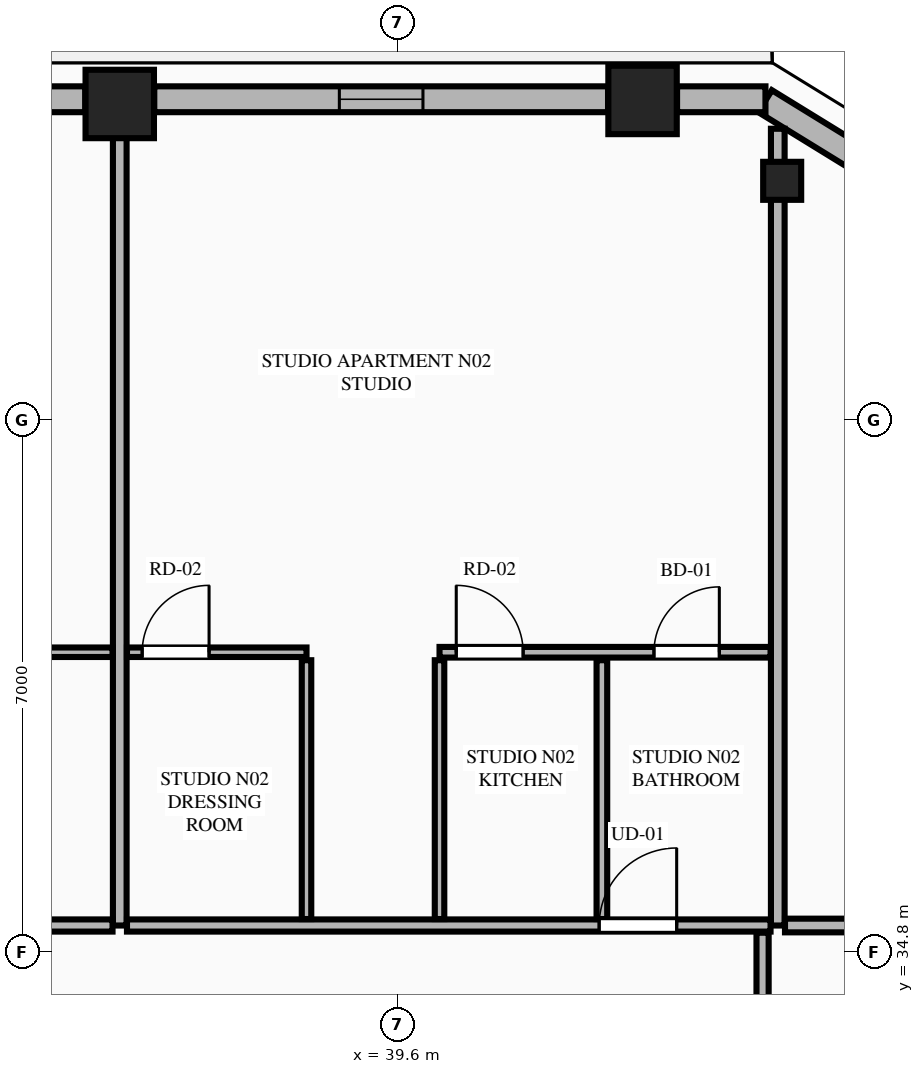
"""IFC4 building model, lengths in metres.
Left out: names, types, materials, properties, quantities, classifications, styles, units other than length and angle.
Written with IfcOpenShell. Run it as: python <this file> out.ifc"""

import sys

from ifc_helpers import new_model, si_unit, direction, frame, frame_2d, origin, origin_2d, place, context, subcontext, project, spatial, rectangle, extrude, element, fill, save


model = new_model("IFC4")
c1 = context("Model", 3, precision=1e-05, world=origin(), true_north=direction((0.0, 1.0)))
c2 = subcontext(c1, "Body", "Model", "MODEL_VIEW")
j1 = project(units=[si_unit("LENGTHUNIT", "METRE"), si_unit("PLANEANGLEUNIT", "RADIAN")], contexts=[c1])
p1 = place(None, origin())
s1 = spatial("IfcSite", under=j1, at=p1, CompositionType="ELEMENT")
p2 = place(p1, origin())
s2 = spatial("IfcBuilding", under=s1, at=p2, CompositionType="ELEMENT")
p3 = place(p2, frame((0.0, 0.0, 179.0)))
s3 = spatial("IfcBuildingStorey", under=s2, at=p3, CompositionType="ELEMENT", Elevation=179.0)
for number, where, z_axis, x_axis in (
    (1, (42.821, 46.011, 0.0), (0.0, 0.0, 1.0), (1.0, 0.0, 0.0)),
    (2, (35.943, 45.958, 0.0), (0.0, 0.0, 1.0), (1.0, 0.0, 0.0)),
):
    element("IfcColumn", number, at=place(p3, frame(where, z_axis=z_axis, x_axis=x_axis)), inside=s3, PredefinedType="COLUMN", context=c2, shape_type="SweptSolid", body=[
        extrude(rectangle(XDim=0.9, YDim=0.9, at=origin_2d()), origin(), (0.0, 0.0, 1.0), 3.55),
    ])
p4 = place(p3, frame((44.658, 44.947, 0.0), z_axis=(0.0, 0.0, 1.0), x_axis=(-0.865230187018, 0.501374833306, 0.0)))
e3 = element("IfcColumn", 3, at=p4, inside=s3, PredefinedType="PILASTER", context=c2, shape_type="SweptSolid", body=[
    extrude(rectangle(XDim=0.5, YDim=0.35, at=origin_2d()), origin(), (0.0, 0.0, 1.0), 3.55),
])
p5 = place(p3, frame((45.862, 45.116, 0.0), z_axis=(0.0, 0.0, 1.0), x_axis=(-0.851713271379, 0.524008113828, 0.0)))
e4 = element("IfcWall", 4, at=p5, inside=s3, PredefinedType="STANDARD", context=c2, shape_type="SweptSolid", body=[
    extrude(rectangle(XDim=1.678, YDim=0.34, at=frame_2d((0.839, 0.0))), origin(), (0.0, 0.0, 1.0), 3.35),
])
p6 = place(p3, frame((44.438, 46.02, 0.0), z_axis=(0.0, 0.0, 1.0), x_axis=(-1.0, 0.0, 0.0)))
e5 = element("IfcWall", 5, at=p6, inside=s3, PredefinedType="STANDARD", context=c2, shape_type="SweptSolid", body=[
    extrude(rectangle(XDim=1.163, YDim=0.34, at=frame_2d((0.582, 0.0))), origin(), (0.0, 0.0, 1.0), 3.35),
])
p7 = place(p3, frame((42.367, 46.02, 0.0), z_axis=(0.0, 0.0, 1.0), x_axis=(-1.0, 0.0, 0.0)))
e6 = element("IfcWall", 6, at=p7, inside=s3, PredefinedType="STANDARD", context=c2, shape_type="SweptSolid", body=[
    extrude(rectangle(XDim=5.97, YDim=0.34, at=frame_2d((2.985, 0.0))), origin(), (0.0, 0.0, 1.0), 2.883),
])
p8 = place(p7, frame((2.435, 0.0, 0.75)))
e7 = element("IfcOpeningElement", 7, at=p8, cuts=e6, PredefinedType="OPENING", context=c2, shape_type="SweptSolid", body=[
    extrude(rectangle(XDim=1.1, YDim=1.983, at=frame_2d((0.55, 0.991))), frame((0.0, 0.18, 0.0), z_axis=(0.0, -1.0, 0.0), x_axis=(1.0, 0.0, 0.0)), (0.0, 0.0, 1.0), 0.36),
])
p9 = place(p3, frame((35.489, 46.02, 0.0), z_axis=(0.0, 0.0, 1.0), x_axis=(-1.0, 0.0, 0.0)))
e8 = element("IfcWall", 8, at=p9, inside=s3, PredefinedType="STANDARD", context=c2, shape_type="SweptSolid", body=[
    extrude(rectangle(XDim=6.178, YDim=0.34, at=frame_2d((3.089, 0.0))), origin(), (0.0, 0.0, 1.0), 2.883),
])
p10 = place(p9, frame((1.668, 0.0, 0.0)))
e9 = element("IfcOpeningElement", 9, at=p10, cuts=e8, PredefinedType="OPENING", context=c2, shape_type="SweptSolid", body=[
    extrude(rectangle(XDim=1.1, YDim=2.25, at=frame_2d((0.55, 1.125))), frame((0.0, 0.18, 0.0), z_axis=(0.0, -1.0, 0.0), x_axis=(1.0, 0.0, 0.0)), (0.0, 0.0, 1.0), 0.36),
])
p11 = place(p9, frame((4.872, 0.0, 0.75)))
e10 = element("IfcOpeningElement", 10, at=p11, cuts=e8, PredefinedType="OPENING", context=c2, shape_type="SweptSolid", body=[
    extrude(rectangle(XDim=1.086, YDim=1.983, at=frame_2d((0.543, 0.991))), frame((0.0, 0.18, 0.0), z_axis=(0.0, -1.0, 0.0), x_axis=(1.0, 0.0, 0.0)), (0.0, 0.0, 1.0), 0.36),
])
p12 = place(p3, frame((35.943, 35.15, 0.0), z_axis=(0.0, 0.0, 1.0), x_axis=(0.0, 1.0, 0.0)))
e11 = element("IfcWall", 11, at=p12, inside=s3, PredefinedType="PARTITIONING", context=c2, shape_type="SweptSolid", body=[
    extrude(rectangle(XDim=10.695, YDim=0.18, at=frame_2d((5.348, 0.0))), origin(), (0.0, 0.0, 1.0), 2.807),
])
p13 = place(p3, frame((44.6, 35.15, 0.0), z_axis=(0.0, 0.0, 1.0), x_axis=(0.0, 1.0, 0.0)))
e12 = element("IfcWall", 12, at=p13, inside=s3, PredefinedType="PARTITIONING", context=c2, shape_type="SweptSolid", body=[
    extrude(rectangle(XDim=10.482, YDim=0.18, at=frame_2d((5.241, 0.0))), origin(), (0.0, 0.0, 1.0), 3.35),
])
p14 = place(p3, frame((20.295, 35.15, 0.0), z_axis=(0.0, 0.0, 1.0), x_axis=(1.0, 0.0, 0.0)))
e13 = element("IfcWall", 13, at=p14, inside=s3, PredefinedType="PARTITIONING", context=c2, shape_type="SweptSolid", body=[
    extrude(rectangle(XDim=15.553, YDim=0.16, at=frame_2d((7.776, 0.0))), origin(), (0.0, 0.0, 1.0), 3.35),
])
p15 = place(p14, frame((0.405, 0.0, 0.0)))
e14 = element("IfcOpeningElement", 14, at=p15, cuts=e13, PredefinedType="OPENING", context=c2, shape_type="SweptSolid", body=[
    extrude(rectangle(XDim=1.02, YDim=2.25, at=frame_2d((0.51, 1.125))), frame((0.0, 0.09, 0.0), z_axis=(0.0, -1.0, 0.0), x_axis=(1.0, 0.0, 0.0)), (0.0, 0.0, 1.0), 0.18),
])
p16 = place(p3, frame((30.95, 38.745, 0.0), z_axis=(0.0, 0.0, 1.0), x_axis=(1.0, 0.0, 0.0)))
e15 = element("IfcWall", 15, at=p16, inside=s3, PredefinedType="PARTITIONING", context=c2, shape_type="SweptSolid", body=[
    extrude(rectangle(XDim=4.898, YDim=0.125, at=frame_2d((2.449, 0.0))), origin(), (0.0, 0.0, 1.0), 3.35),
])
p17 = place(p16, frame((2.024, 0.0, 0.0)))
e16 = element("IfcOpeningElement", 16, at=p17, cuts=e15, PredefinedType="OPENING", context=c2, shape_type="SweptSolid", body=[
    extrude(rectangle(XDim=0.86, YDim=2.1, at=frame_2d((0.43, 1.05))), frame((0.0, 0.073, 0.0), z_axis=(0.0, -1.0, 0.0), x_axis=(1.0, 0.0, 0.0)), (0.0, 0.0, 1.0), 0.145),
])
p18 = place(p3, frame((36.038, 35.15, 0.0), z_axis=(0.0, 0.0, 1.0), x_axis=(1.0, 0.0, 0.0)))
e17 = element("IfcWall", 17, at=p18, inside=s3, PredefinedType="PARTITIONING", context=c2, shape_type="SweptSolid", body=[
    extrude(rectangle(XDim=8.467, YDim=0.16, at=frame_2d((4.233, 0.0))), origin(), (0.0, 0.0, 1.0), 3.35),
])
p19 = place(p18, frame((6.212, 0.0, 0.0)))
e18 = element("IfcOpeningElement", 18, at=p19, cuts=e17, PredefinedType="OPENING", context=c2, shape_type="SweptSolid", body=[
    extrude(rectangle(XDim=1.02, YDim=2.25, at=frame_2d((0.51, 1.125))), frame((0.0, 0.09, 0.0), z_axis=(0.0, -1.0, 0.0), x_axis=(1.0, 0.0, 0.0)), (0.0, 0.0, 1.0), 0.18),
])
p20 = place(p3, frame((40.15, 35.235, 0.0), z_axis=(0.0, 0.0, 1.0), x_axis=(0.0, 1.0, 0.0)))
e19 = element("IfcWall", 19, at=p20, inside=s3, PredefinedType="PARTITIONING", context=c2, shape_type="SweptSolid", body=[
    extrude(rectangle(XDim=3.405, YDim=0.125, at=frame_2d((1.702, 0.0))), origin(), (0.0, 0.0, 1.0), 3.35),
])
p21 = place(p3, frame((40.15, 38.745, 0.0), z_axis=(0.0, 0.0, 1.0), x_axis=(1.0, 0.0, 0.0)))
e20 = element("IfcWall", 20, at=p21, inside=s3, PredefinedType="PLUMBINGWALL", context=c2, shape_type="SweptSolid", body=[
    extrude(rectangle(XDim=4.355, YDim=0.14, at=frame_2d((2.177, 0.0))), origin(), (0.0, 0.0, 1.0), 3.35),
])
p22 = place(p21, frame((2.821, 0.0, 0.0)))
e21 = element("IfcOpeningElement", 21, at=p22, cuts=e20, PredefinedType="OPENING", context=c2, shape_type="SweptSolid", body=[
    extrude(rectangle(XDim=0.86, YDim=2.1, at=frame_2d((0.43, 1.05))), frame((0.0, 0.08, 0.0), z_axis=(0.0, -1.0, 0.0), x_axis=(1.0, 0.0, 0.0)), (0.0, 0.0, 1.0), 0.16),
])
p23 = place(p21, frame((0.22, 0.0, 0.0)))
e22 = element("IfcOpeningElement", 22, at=p23, cuts=e20, PredefinedType="OPENING", context=c2, shape_type="SweptSolid", body=[
    extrude(rectangle(XDim=0.88, YDim=2.15, at=frame_2d((0.44, 1.075))), frame((0.0, 0.08, 0.0), z_axis=(0.0, -1.0, 0.0), x_axis=(1.0, 0.0, 0.0)), (0.0, 0.0, 1.0), 0.16),
])
p24 = place(p3, frame((42.286, 35.235, 0.0), z_axis=(0.0, 0.0, 1.0), x_axis=(0.0, 1.0, 0.0)))
e23 = element("IfcWall", 23, at=p24, inside=s3, PredefinedType="PLUMBINGWALL", context=c2, shape_type="SweptSolid", body=[
    extrude(rectangle(XDim=3.405, YDim=0.14, at=frame_2d((1.702, 0.0))), origin(), (0.0, 0.0, 1.0), 2.807),
])
p25 = place(p3, frame((38.4, 35.235, 0.0), z_axis=(0.0, 0.0, 1.0), x_axis=(0.0, 1.0, 0.0)))
e24 = element("IfcWall", 24, at=p25, inside=s3, PredefinedType="PARTITIONING", context=c2, shape_type="SweptSolid", body=[
    extrude(rectangle(XDim=3.405, YDim=0.125, at=frame_2d((1.702, 0.0))), origin(), (0.0, 0.0, 1.0), 3.35),
])
p26 = place(p3, frame((36.038, 38.745, 0.0), z_axis=(0.0, 0.0, 1.0), x_axis=(1.0, 0.0, 0.0)))
e25 = element("IfcWall", 25, at=p26, inside=s3, PredefinedType="PARTITIONING", context=c2, shape_type="SweptSolid", body=[
    extrude(rectangle(XDim=2.362, YDim=0.125, at=frame_2d((1.181, 0.0))), origin(), (0.0, 0.0, 1.0), 3.35),
])
p27 = place(p26, frame((0.2, 0.0, 0.0)))
e26 = element("IfcOpeningElement", 26, at=p27, cuts=e25, PredefinedType="OPENING", context=c2, shape_type="SweptSolid", body=[
    extrude(rectangle(XDim=0.88, YDim=2.15, at=frame_2d((0.44, 1.075))), frame((0.0, 0.073, 0.0), z_axis=(0.0, -1.0, 0.0), x_axis=(1.0, 0.0, 0.0)), (0.0, 0.0, 1.0), 0.145),
])
p28 = place(p3, frame((44.695, 35.15, 0.0), z_axis=(0.0, 0.0, 1.0), x_axis=(1.0, 0.0, 0.0)))
e27 = element("IfcWall", 27, at=p28, inside=s3, PredefinedType="PARTITIONING", context=c2, shape_type="SweptSolid", body=[
    extrude(rectangle(XDim=5.995, YDim=0.18, at=frame_2d((2.998, 0.0))), origin(), (0.0, 0.0, 1.0), 3.35),
])
p29 = place(p3, frame((44.4, 16.345, 0.0), z_axis=(0.0, 0.0, 1.0), x_axis=(0.0, 1.0, 0.0)))
e28 = element("IfcWall", 28, at=p29, inside=s3, PredefinedType="PARTITIONING", context=c2, shape_type="SweptSolid", body=[
    extrude(rectangle(XDim=18.71, YDim=0.16, at=frame_2d((9.355, 0.0))), origin(), (0.0, 0.0, 1.0), 3.35),
])
p30 = place(p29, frame((0.45, 0.0, 0.0)))
e29 = element("IfcOpeningElement", 29, at=p30, cuts=e28, PredefinedType="OPENING", context=c2, shape_type="SweptSolid", body=[
    extrude(rectangle(XDim=1.02, YDim=2.25, at=frame_2d((0.51, 1.125))), frame((0.0, 0.09, 0.0), z_axis=(0.0, -1.0, 0.0), x_axis=(1.0, 0.0, 0.0)), (0.0, 0.0, 1.0), 0.18),
])
p31 = place(p8, origin())
e30 = element("IfcWindow", 30, at=p31, inside=s3, PartitioningType="SINGLE_PANEL", PredefinedType="WINDOW", context=c2, shape_type="SweptSolid", body=[
    extrude(rectangle(XDim=1.1, YDim=1.983, at=frame_2d((0.55, 0.991))), frame((0.0, 0.03, 0.0), z_axis=(0.0, -1.0, 0.0), x_axis=(1.0, 0.0, 0.0)), (0.0, 0.0, 1.0), 0.06),
])
fill(e7, e30)
p32 = place(p27, origin())
e31 = element("IfcDoor", 31, at=p32, inside=s3, OperationType="SINGLE_SWING_RIGHT", PredefinedType="DOOR", context=c2, shape_type="SweptSolid", body=[
    extrude(rectangle(XDim=0.88, YDim=2.15, at=frame_2d((0.44, 1.075))), frame((0.0, 0.025, 0.0), z_axis=(0.0, -1.0, 0.0), x_axis=(1.0, 0.0, 0.0)), (0.0, 0.0, 1.0), 0.05),
])
fill(e26, e31)
p33 = place(p22, origin())
e32 = element("IfcDoor", 32, at=p33, inside=s3, OperationType="SINGLE_SWING_RIGHT", PredefinedType="DOOR", context=c2, shape_type="SweptSolid", body=[
    extrude(rectangle(XDim=0.86, YDim=2.1, at=frame_2d((0.43, 1.05))), frame((0.0, 0.025, 0.0), z_axis=(0.0, -1.0, 0.0), x_axis=(1.0, 0.0, 0.0)), (0.0, 0.0, 1.0), 0.05),
])
fill(e21, e32)
p34 = place(p19, origin())
e33 = element("IfcDoor", 33, at=p34, inside=s3, OperationType="SINGLE_SWING_RIGHT", PredefinedType="DOOR", context=c2, shape_type="SweptSolid", body=[
    extrude(rectangle(XDim=1.02, YDim=2.25, at=frame_2d((0.51, 1.125))), frame((0.0, 0.025, 0.0), z_axis=(0.0, -1.0, 0.0), x_axis=(1.0, 0.0, 0.0)), (0.0, 0.0, 1.0), 0.05),
])
fill(e18, e33)
p35 = place(p23, origin())
e34 = element("IfcDoor", 34, at=p35, inside=s3, OperationType="SINGLE_SWING_LEFT", PredefinedType="DOOR", context=c2, shape_type="SweptSolid", body=[
    extrude(rectangle(XDim=0.88, YDim=2.15, at=frame_2d((0.44, 1.075))), frame((0.0, 0.025, 0.0), z_axis=(0.0, -1.0, 0.0), x_axis=(1.0, 0.0, 0.0)), (0.0, 0.0, 1.0), 0.05),
])
fill(e22, e34)
save(model, sys.argv[1])
